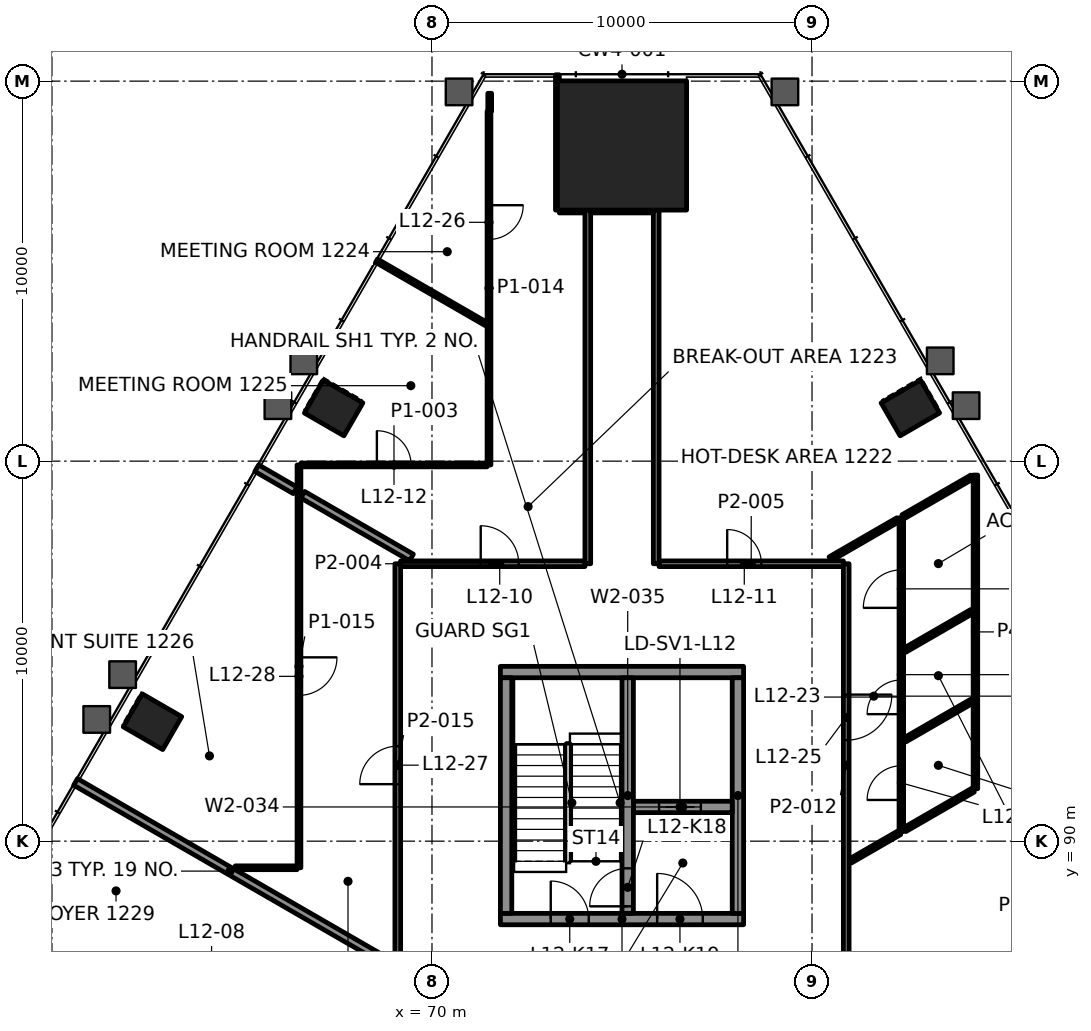
"""IFC4 building model, lengths in metres.
Left out: names, types, materials, properties, quantities, classifications, styles, units other than length and angle.
Written with IfcOpenShell. Run it as: python <this file> out.ifc"""

import sys

from ifc_helpers import new_model, si_unit, direction, frame, frame_2d, origin, origin_2d, place, context, subcontext, project, spatial, rectangle, extrude, element, fill, save


model = new_model("IFC4")
c1 = context("Model", 3, precision=1e-05, world=origin(), true_north=direction((0.0, 1.0)))
c2 = subcontext(c1, "Body", "Model", "MODEL_VIEW")
j1 = project(units=[si_unit("LENGTHUNIT", "METRE"), si_unit("PLANEANGLEUNIT", "RADIAN")], contexts=[c1])
p1 = place(None, origin())
s1 = spatial("IfcSite", under=j1, at=p1, CompositionType="ELEMENT")
p2 = place(p1, origin())
s2 = spatial("IfcBuilding", under=s1, at=p2, CompositionType="ELEMENT")
p3 = place(p2, frame((0.0, 0.0, 56.8)))
s3 = spatial("IfcBuildingStorey", under=s2, at=p3, CompositionType="ELEMENT", Elevation=56.8)
p4 = place(p3, frame((75.0, 108.307, 0.0), z_axis=(0.0, 0.0, 1.0), x_axis=(-1.0, 0.0, 0.0)))
e1 = element("IfcColumn", 1, at=p4, inside=s3, PredefinedType="COLUMN", context=c2, shape_type="SweptSolid", body=[
    extrude(rectangle(XDim=3.4, YDim=3.4, at=origin_2d()), origin(), (0.0, 0.0, 1.0), 4.2),
])
for number, where, z_axis, x_axis in (
    (2, (82.588, 101.4, -0.0), (0.0, 0.0, 1.0), (-0.5, 0.866, 0.0)),
    (3, (67.412, 101.4, -0.0), (0.0, 0.0, 1.0), (-0.5, -0.866, 0.0)),
    (4, (62.645, 93.143, -0.0), (0.0, 0.0, 1.0), (-0.5, -0.866, 0.0)),
):
    element("IfcColumn", number, at=place(p3, frame(where, z_axis=z_axis, x_axis=x_axis)), inside=s3, PredefinedType="COLUMN", context=c2, shape_type="SweptSolid", body=[
        extrude(rectangle(XDim=1.0, YDim=1.2, at=origin_2d()), origin(), (0.0, 0.0, 1.0), 4.2),
    ])
p5 = place(p3, frame((71.8, 87.95, 0.0), z_axis=(0.0, 0.0, 1.0), x_axis=(1.0, 0.0, 0.0)))
e5 = element("IfcWall", 5, at=p5, inside=s3, PredefinedType="SHEAR", context=c2, shape_type="SweptSolid", body=[
    extrude(rectangle(XDim=6.4, YDim=0.3, at=frame_2d((3.2, 0.0))), origin(), (0.0, 0.0, 1.0), 4.0),
])
p6 = place(p5, frame((1.325, 0.0, 0.0)))
e6 = element("IfcOpeningElement", 6, at=p6, cuts=e5, PredefinedType="OPENING", context=c2, shape_type="SweptSolid", body=[
    extrude(rectangle(XDim=1.0, YDim=2.1, at=frame_2d((0.5, 1.05))), frame((0.0, 0.16, 0.0), z_axis=(0.0, -1.0, 0.0), x_axis=(1.0, 0.0, 0.0)), (0.0, 0.0, 1.0), 0.32),
])
p7 = place(p5, frame((4.125, 0.0, 0.0)))
e7 = element("IfcOpeningElement", 7, at=p7, cuts=e5, PredefinedType="OPENING", context=c2, shape_type="SweptSolid", body=[
    extrude(rectangle(XDim=1.2, YDim=2.1, at=frame_2d((0.6, 1.05))), frame((0.0, 0.16, 0.0), z_axis=(0.0, -1.0, 0.0), x_axis=(1.0, 0.0, 0.0)), (0.0, 0.0, 1.0), 0.32),
])
p8 = place(p3, frame((71.8, 94.45, 0.0), z_axis=(0.0, 0.0, 1.0), x_axis=(1.0, 0.0, 0.0)))
e8 = element("IfcWall", 8, at=p8, inside=s3, PredefinedType="SHEAR", context=c2, shape_type="SweptSolid", body=[
    extrude(rectangle(XDim=6.4, YDim=0.3, at=frame_2d((3.2, 0.0))), origin(), (0.0, 0.0, 1.0), 4.0),
])
for number, where, z_axis, x_axis in (
    (9, (71.95, 88.1, 0.0), (0.0, 0.0, 1.0), (0.0, 1.0, 0.0)),
    (10, (78.05, 88.1, 0.0), (0.0, 0.0, 1.0), (0.0, 1.0, 0.0)),
):
    element("IfcWall", number, at=place(p3, frame(where, z_axis=z_axis, x_axis=x_axis)), inside=s3, PredefinedType="SHEAR", context=c2, shape_type="SweptSolid", body=[
        extrude(rectangle(XDim=6.2, YDim=0.3, at=frame_2d((3.1, 0.0))), origin(), (0.0, 0.0, 1.0), 4.0),
    ])
p9 = place(p3, frame((75.3, 90.9, 0.0), z_axis=(0.0, 0.0, 1.0), x_axis=(1.0, 0.0, 0.0)))
e11 = element("IfcWall", 11, at=p9, inside=s3, PredefinedType="SHEAR", context=c2, shape_type="SweptSolid", body=[
    extrude(rectangle(XDim=2.6, YDim=0.3, at=frame_2d((1.3, 0.0))), origin(), (0.0, 0.0, 1.0), 4.0),
])
p10 = place(p9, frame((0.675, 0.0, 0.0)))
e12 = element("IfcOpeningElement", 12, at=p10, cuts=e11, PredefinedType="OPENING", context=c2, shape_type="SweptSolid", body=[
    extrude(rectangle(XDim=1.1, YDim=2.1, at=frame_2d((0.55, 1.05))), frame((0.0, 0.16, 0.0), z_axis=(0.0, -1.0, 0.0), x_axis=(1.0, 0.0, 0.0)), (0.0, 0.0, 1.0), 0.32),
])
p11 = place(p3, frame((75.15, 88.1, 0.0), z_axis=(0.0, 0.0, 1.0), x_axis=(0.0, 1.0, 0.0)))
e13 = element("IfcWall", 13, at=p11, inside=s3, PredefinedType="SHEAR", context=c2, shape_type="SweptSolid", body=[
    extrude(rectangle(XDim=6.2, YDim=0.3, at=frame_2d((3.1, 0.0))), origin(), (0.0, 0.0, 1.0), 4.0),
])
p12 = place(p11, frame((0.185, 0.0, 0.0)))
e14 = element("IfcOpeningElement", 14, at=p12, cuts=e13, PredefinedType="OPENING", context=c2, shape_type="SweptSolid", body=[
    extrude(rectangle(XDim=1.0, YDim=2.1, at=frame_2d((0.5, 1.05))), frame((0.0, 0.16, 0.0), z_axis=(0.0, -1.0, 0.0), x_axis=(1.0, 0.0, 0.0)), (0.0, 0.0, 1.0), 0.32),
])
p13 = place(p3, frame((64.823, 89.3, 0.0), z_axis=(0.0, 0.0, 1.0), x_axis=(1.0, 0.0, 0.0)))
e15 = element("IfcWall", 15, at=p13, inside=s3, PredefinedType="PARTITIONING", context=c2, shape_type="SweptSolid", body=[
    extrude(rectangle(XDim=1.627, YDim=0.1, at=frame_2d((0.813, 0.0))), origin(), (0.0, 0.0, 1.0), 3.4),
])
p14 = place(p3, frame((69.175, 97.3, 0.0), z_axis=(0.0, 0.0, 1.0), x_axis=(1.0, 0.0, 0.0)))
e16 = element("IfcWall", 16, at=p14, inside=s3, PredefinedType="PARTITIONING", context=c2, shape_type="SweptSolid", body=[
    extrude(rectangle(XDim=4.85, YDim=0.15, at=frame_2d((2.425, 0.0))), origin(), (0.0, 0.0, 1.0), 3.4),
])
p15 = place(p14, frame((2.107, 0.0, 0.0)))
e17 = element("IfcOpeningElement", 17, at=p15, cuts=e16, PredefinedType="OPENING", context=c2, shape_type="SweptSolid", body=[
    extrude(rectangle(XDim=1.0, YDim=2.1, at=frame_2d((0.5, 1.05))), frame((0.0, 0.085, 0.0), z_axis=(0.0, -1.0, 0.0), x_axis=(1.0, 0.0, 0.0)), (0.0, 0.0, 1.0), 0.17),
])
p16 = place(p3, frame((75.975, 97.3, 0.0), z_axis=(0.0, 0.0, 1.0), x_axis=(1.0, 0.0, 0.0)))
e18 = element("IfcWall", 18, at=p16, inside=s3, PredefinedType="PARTITIONING", context=c2, shape_type="SweptSolid", body=[
    extrude(rectangle(XDim=4.85, YDim=0.15, at=frame_2d((2.425, 0.0))), origin(), (0.0, 0.0, 1.0), 3.4),
])
p17 = place(p16, frame((1.792, 0.0, 0.0)))
e19 = element("IfcOpeningElement", 19, at=p17, cuts=e18, PredefinedType="OPENING", context=c2, shape_type="SweptSolid", body=[
    extrude(rectangle(XDim=0.9, YDim=2.1, at=frame_2d((0.45, 1.05))), frame((0.0, 0.085, 0.0), z_axis=(0.0, -1.0, 0.0), x_axis=(1.0, 0.0, 0.0)), (0.0, 0.0, 1.0), 0.17),
])
p18 = place(p3, frame((66.551, 99.9, 0.0), z_axis=(0.0, 0.0, 1.0), x_axis=(1.0, 0.0, 0.0)))
e20 = element("IfcWall", 20, at=p18, inside=s3, PredefinedType="PARTITIONING", context=c2, shape_type="SweptSolid", body=[
    extrude(rectangle(XDim=4.899, YDim=0.1, at=frame_2d((2.45, 0.0))), origin(), (0.0, 0.0, 1.0), 3.165),
])
p19 = place(p18, frame((2.0, 0.0, 0.0)))
e21 = element("IfcOpeningElement", 21, at=p19, cuts=e20, PredefinedType="OPENING", context=c2, shape_type="SweptSolid", body=[
    extrude(rectangle(XDim=0.9, YDim=2.1, at=frame_2d((0.45, 1.05))), frame((0.0, 0.06, 0.0), z_axis=(0.0, -1.0, 0.0), x_axis=(1.0, 0.0, 0.0)), (0.0, 0.0, 1.0), 0.12),
])
p20 = place(p3, frame((73.351, 106.607, 0.0), z_axis=(0.0, 0.0, 1.0), x_axis=(1.0, 0.0, 0.0)))
e22 = element("IfcWall", 22, at=p20, inside=s3, PredefinedType="PARTITIONING", context=c2, shape_type="SweptSolid", body=[
    extrude(rectangle(XDim=0.674, YDim=0.15, at=frame_2d((0.337, 0.0))), origin(), (0.0, 0.0, 1.0), 3.4),
])
p21 = place(p3, frame((81.01, 89.479, 0.0), z_axis=(0.0, 0.0, 1.0), x_axis=(0.866055123991, 0.49994851956, 0.0)))
e23 = element("IfcWall", 23, at=p21, inside=s3, PredefinedType="PARTITIONING", context=c2, shape_type="SweptSolid", body=[
    extrude(rectangle(XDim=1.496, YDim=0.12, at=frame_2d((0.748, 0.0))), origin(), (0.0, 0.0, 1.0), 3.4),
])
for number, where, z_axis, x_axis in (
    (24, (82.445, 92.666, 0.0), (0.0, 0.0, 1.0), (0.866, 0.5, 0.0)),
    (25, (82.444, 95.026, 0.0), (0.0, 0.0, 1.0), (0.866, 0.5, 0.0)),
):
    element("IfcWall", number, at=place(p3, frame(where, z_axis=z_axis, x_axis=x_axis)), inside=s3, PredefinedType="PARTITIONING", context=c2, shape_type="SweptSolid", body=[
        extrude(rectangle(XDim=2.033, YDim=0.12, at=frame_2d((1.017, 0.0))), origin(), (0.0, 0.0, 1.0), 3.4),
    ])
p22 = place(p3, frame((80.479, 97.43, 0.0), z_axis=(0.0, 0.0, 1.0), x_axis=(0.866057052383, 0.499945179012, 0.0)))
e26 = element("IfcWall", 26, at=p22, inside=s3, PredefinedType="PARTITIONING", context=c2, shape_type="SweptSolid", body=[
    extrude(rectangle(XDim=2.056, YDim=0.12, at=frame_2d((1.028, 0.0))), origin(), (0.0, 0.0, 1.0), 3.4),
])
p23 = place(p3, frame((84.3, 91.379, 0.0), z_axis=(0.0, 0.0, 1.0), x_axis=(0.0, 1.0, 0.0)))
e27 = element("IfcWall", 27, at=p23, inside=s3, PredefinedType="PARTITIONING", context=c2, shape_type="SweptSolid", body=[
    extrude(rectangle(XDim=8.255, YDim=0.12, at=frame_2d((4.127, 0.0))), origin(), (0.0, 0.0, 1.0), 3.165),
])
p24 = place(p3, frame((82.35, 90.253, 0.0), z_axis=(0.0, 0.0, 1.0), x_axis=(0.0, 1.0, 0.0)))
e28 = element("IfcWall", 28, at=p24, inside=s3, PredefinedType="PARTITIONING", context=c2, shape_type="SweptSolid", body=[
    extrude(rectangle(XDim=8.257, YDim=0.12, at=frame_2d((4.128, 0.0))), origin(), (0.0, 0.0, 1.0), 3.4),
])
p25 = place(p24, frame((0.831, 0.0, 0.0)))
e29 = element("IfcOpeningElement", 29, at=p25, cuts=e28, PredefinedType="OPENING", context=c2, shape_type="SweptSolid", body=[
    extrude(rectangle(XDim=0.9, YDim=2.1, at=frame_2d((0.45, 1.05))), frame((0.0, 0.07, 0.0), z_axis=(0.0, -1.0, 0.0), x_axis=(1.0, 0.0, 0.0)), (0.0, 0.0, 1.0), 0.14),
])
p26 = place(p24, frame((3.089, 0.0, 0.0)))
e30 = element("IfcOpeningElement", 30, at=p26, cuts=e28, PredefinedType="OPENING", context=c2, shape_type="SweptSolid", body=[
    extrude(rectangle(XDim=0.9, YDim=2.1, at=frame_2d((0.45, 1.05))), frame((0.0, 0.07, 0.0), z_axis=(0.0, -1.0, 0.0), x_axis=(1.0, 0.0, 0.0)), (0.0, 0.0, 1.0), 0.14),
])
p27 = place(p24, frame((5.886, 0.0, 0.0)))
e31 = element("IfcOpeningElement", 31, at=p27, cuts=e28, PredefinedType="OPENING", context=c2, shape_type="SweptSolid", body=[
    extrude(rectangle(XDim=1.0, YDim=2.1, at=frame_2d((0.5, 1.05))), frame((0.0, 0.07, 0.0), z_axis=(0.0, -1.0, 0.0), x_axis=(1.0, 0.0, 0.0)), (0.0, 0.0, 1.0), 0.14),
])
p28 = place(p3, frame((80.9, 97.3, 0.0), z_axis=(0.0, 0.0, 1.0), x_axis=(0.0, -1.0, 0.0)))
e32 = element("IfcWall", 32, at=p28, inside=s3, PredefinedType="PARTITIONING", context=c2, shape_type="SweptSolid", body=[
    extrude(rectangle(XDim=10.6, YDim=0.15, at=frame_2d((5.3, 0.0))), origin(), (0.0, 0.0, 1.0), 3.4),
])
p29 = place(p28, frame((3.444, 0.0, 0.0)))
e33 = element("IfcOpeningElement", 33, at=p29, cuts=e32, PredefinedType="OPENING", context=c2, shape_type="SweptSolid", body=[
    extrude(rectangle(XDim=1.2, YDim=2.1, at=frame_2d((0.6, 1.05))), frame((0.0, 0.085, 0.0), z_axis=(0.0, -1.0, 0.0), x_axis=(1.0, 0.0, 0.0)), (0.0, 0.0, 1.0), 0.17),
])
p30 = place(p3, frame((75.9, 97.3, 0.0), z_axis=(0.0, 0.0, 1.0), x_axis=(0.0, 1.0, 0.0)))
e34 = element("IfcWall", 34, at=p30, inside=s3, PredefinedType="PARTITIONING", context=c2, shape_type="SweptSolid", body=[
    extrude(rectangle(XDim=9.306, YDim=0.15, at=frame_2d((4.653, 0.0))), origin(), (0.0, 0.0, 1.0), 3.4),
])
p31 = place(p3, frame((74.1, 97.3, 0.0), z_axis=(0.0, 0.0, 1.0), x_axis=(0.0, 1.0, 0.0)))
e35 = element("IfcWall", 35, at=p31, inside=s3, PredefinedType="PARTITIONING", context=c2, shape_type="SweptSolid", body=[
    extrude(rectangle(XDim=9.307, YDim=0.15, at=frame_2d((4.653, 0.0))), origin(), (0.0, 0.0, 1.0), 3.4),
])
p32 = place(p3, frame((73.3, 106.607, 0.0), z_axis=(0.0, 0.0, 1.0), x_axis=(0.0, 1.0, 0.0)))
e36 = element("IfcWall", 36, at=p32, inside=s3, PredefinedType="PARTITIONING", context=c2, shape_type="SweptSolid", body=[
    extrude(rectangle(XDim=3.56, YDim=0.1, at=frame_2d((1.78, 0.0))), origin(), (0.0, 0.0, 1.0), 3.4),
])
p33 = place(p3, frame((71.519, 109.207, 0.0), z_axis=(0.0, 0.0, 1.0), x_axis=(0.0, 1.0, 0.0)))
e37 = element("IfcWall", 37, at=p33, inside=s3, PredefinedType="PARTITIONING", context=c2, shape_type="SweptSolid", body=[
    extrude(rectangle(XDim=0.473, YDim=0.1, at=frame_2d((0.237, 0.0))), origin(), (0.0, 0.0, 1.0), 3.4),
])
p34 = place(p3, frame((71.5, 109.206, 0.0), z_axis=(0.0, 0.0, 1.0), x_axis=(0.0, -1.0, 0.0)))
e38 = element("IfcWall", 38, at=p34, inside=s3, PredefinedType="PARTITIONING", context=c2, shape_type="SweptSolid", body=[
    extrude(rectangle(XDim=9.306, YDim=0.1, at=frame_2d((4.653, 0.0))), origin(), (0.0, 0.0, 1.0), 3.4),
])
p35 = place(p34, frame((2.471, 0.0, 0.0)))
e39 = element("IfcOpeningElement", 39, at=p35, cuts=e38, PredefinedType="OPENING", context=c2, shape_type="SweptSolid", body=[
    extrude(rectangle(XDim=0.9, YDim=2.1, at=frame_2d((0.45, 1.05))), frame((0.0, 0.06, 0.0), z_axis=(0.0, -1.0, 0.0), x_axis=(1.0, 0.0, 0.0)), (0.0, 0.0, 1.0), 0.12),
])
p36 = place(p3, frame((69.1, 86.7, 0.0), z_axis=(0.0, 0.0, 1.0), x_axis=(0.0, 1.0, 0.0)))
e40 = element("IfcWall", 40, at=p36, inside=s3, PredefinedType="PARTITIONING", context=c2, shape_type="SweptSolid", body=[
    extrude(rectangle(XDim=10.6, YDim=0.15, at=frame_2d((5.3, 0.0))), origin(), (0.0, 0.0, 1.0), 3.4),
])
p37 = place(p36, frame((4.8, 0.0, 0.0)))
e41 = element("IfcOpeningElement", 41, at=p37, cuts=e40, PredefinedType="OPENING", context=c2, shape_type="SweptSolid", body=[
    extrude(rectangle(XDim=1.0, YDim=2.1, at=frame_2d((0.5, 1.05))), frame((0.0, 0.085, 0.0), z_axis=(0.0, -1.0, 0.0), x_axis=(1.0, 0.0, 0.0)), (0.0, 0.0, 1.0), 0.17),
])
p38 = place(p3, frame((66.5, 99.899, 0.0), z_axis=(0.0, 0.0, 1.0), x_axis=(0.0, -1.0, 0.0)))
e42 = element("IfcWall", 42, at=p38, inside=s3, PredefinedType="PARTITIONING", context=c2, shape_type="SweptSolid", body=[
    extrude(rectangle(XDim=10.599, YDim=0.1, at=frame_2d((5.3, 0.0))), origin(), (0.0, 0.0, 1.0), 3.165),
])
p39 = place(p38, frame((5.062, 0.0, 0.0)))
e43 = element("IfcOpeningElement", 43, at=p39, cuts=e42, PredefinedType="OPENING", context=c2, shape_type="SweptSolid", body=[
    extrude(rectangle(XDim=1.0, YDim=2.1, at=frame_2d((0.5, 1.05))), frame((0.0, 0.06, 0.0), z_axis=(0.0, -1.0, 0.0), x_axis=(1.0, 0.0, 0.0)), (0.0, 0.0, 1.0), 0.12),
])
p40 = place(p3, frame((71.424, 103.61, 0.0), z_axis=(0.0, 0.0, 1.0), x_axis=(-0.866004823592, 0.500035644245, 0.0)))
e44 = element("IfcWall", 44, at=p40, inside=s3, PredefinedType="PARTITIONING", context=c2, shape_type="SweptSolid", body=[
    extrude(rectangle(XDim=3.329, YDim=0.1, at=frame_2d((1.665, 0.0))), origin(), (0.0, 0.0, 1.0), 3.4),
])
p41 = place(p3, frame((69.46, 97.465, 0.0), z_axis=(0.0, 0.0, 1.0), x_axis=(-0.866027998537, 0.499995505729, 0.0)))
e45 = element("IfcWall", 45, at=p41, inside=s3, PredefinedType="PARTITIONING", context=c2, shape_type="SweptSolid", body=[
    extrude(rectangle(XDim=3.302, YDim=0.2, at=frame_2d((1.651, 0.0))), origin(), (0.0, 0.0, 1.0), 3.4),
])
p42 = place(p3, frame((68.751, 86.865, 0.0), z_axis=(0.0, 0.0, 1.0), x_axis=(-0.8660257632, 0.499999377474, 0.0)))
e46 = element("IfcWall", 46, at=p42, inside=s3, PredefinedType="PARTITIONING", context=c2, shape_type="SweptSolid", body=[
    extrude(rectangle(XDim=9.387, YDim=0.2, at=frame_2d((4.693, 0.0))), origin(), (0.0, 0.0, 1.0), 3.165),
])
p43 = place(p3, frame((74.175, 106.607, 0.0), z_axis=(0.0, 0.0, 1.0), x_axis=(1.0, 0.0, 0.0)))
e47 = element("IfcWall", 47, at=p43, inside=s3, PredefinedType="PARTITIONING", context=c2, shape_type="SweptSolid", body=[
    extrude(rectangle(XDim=1.649, YDim=0.15, at=frame_2d((0.825, 0.0))), origin(), (0.0, 0.0, 1.0), 3.397),
])
p44 = place(p3, frame((82.44, 90.304, 0.0), z_axis=(0.0, 0.0, 1.0), x_axis=(0.866044773228, 0.499966449638, 0.0)))
e48 = element("IfcWall", 48, at=p44, inside=s3, PredefinedType="PARTITIONING", context=c2, shape_type="SweptSolid", body=[
    extrude(rectangle(XDim=2.079, YDim=0.12, at=frame_2d((1.04, 0.0))), origin(), (0.0, 0.0, 1.0), 3.4),
])
p45 = place(p3, frame((82.395, 98.536, 0.0), z_axis=(0.0, 0.0, 1.0), x_axis=(0.866041603473, 0.499971940267, 0.0)))
e49 = element("IfcWall", 49, at=p45, inside=s3, PredefinedType="PARTITIONING", context=c2, shape_type="SweptSolid", body=[
    extrude(rectangle(XDim=2.089, YDim=0.12, at=frame_2d((1.045, 0.0))), origin(), (0.0, 0.0, 1.0), 3.165),
])
p46 = place(p3, frame((66.4, 99.231, 0.0), z_axis=(0.0, 0.0, 1.0), x_axis=(-0.86600796803, 0.500030198396, 0.0)))
e50 = element("IfcWall", 50, at=p46, inside=s3, PredefinedType="PARTITIONING", context=c2, shape_type="SweptSolid", body=[
    extrude(rectangle(XDim=1.167, YDim=0.2, at=frame_2d((0.584, 0.0))), origin(), (0.0, 0.0, 1.0), 3.165),
])
p47 = place(p15, origin())
e51 = element("IfcDoor", 51, at=p47, inside=s3, OperationType="SINGLE_SWING_RIGHT", PredefinedType="DOOR", context=c2, shape_type="SweptSolid", body=[
    extrude(rectangle(XDim=1.0, YDim=2.1, at=frame_2d((0.5, 1.05))), frame((0.0, 0.025, 0.0), z_axis=(0.0, -1.0, 0.0), x_axis=(1.0, 0.0, 0.0)), (0.0, 0.0, 1.0), 0.05),
])
fill(e17, e51)
p48 = place(p17, origin())
e52 = element("IfcDoor", 52, at=p48, inside=s3, OperationType="SINGLE_SWING_LEFT", PredefinedType="DOOR", context=c2, shape_type="SweptSolid", body=[
    extrude(rectangle(XDim=0.9, YDim=2.1, at=frame_2d((0.45, 1.05))), frame((0.0, 0.025, 0.0), z_axis=(0.0, -1.0, 0.0), x_axis=(1.0, 0.0, 0.0)), (0.0, 0.0, 1.0), 0.05),
])
fill(e19, e52)
p49 = place(p19, origin())
e53 = element("IfcDoor", 53, at=p49, inside=s3, OperationType="SINGLE_SWING_RIGHT", PredefinedType="DOOR", context=c2, shape_type="SweptSolid", body=[
    extrude(rectangle(XDim=0.9, YDim=2.1, at=frame_2d((0.45, 1.05))), frame((0.0, 0.025, 0.0), z_axis=(0.0, -1.0, 0.0), x_axis=(1.0, 0.0, 0.0)), (0.0, 0.0, 1.0), 0.05),
])
fill(e21, e53)
p50 = place(p25, origin())
e54 = element("IfcDoor", 54, at=p50, inside=s3, OperationType="SINGLE_SWING_RIGHT", PredefinedType="DOOR", context=c2, shape_type="SweptSolid", body=[
    extrude(rectangle(XDim=0.9, YDim=2.1, at=frame_2d((0.45, 1.05))), frame((0.0, 0.025, 0.0), z_axis=(0.0, -1.0, 0.0), x_axis=(1.0, 0.0, 0.0)), (0.0, 0.0, 1.0), 0.05),
])
fill(e29, e54)
p51 = place(p26, origin())
e55 = element("IfcDoor", 55, at=p51, inside=s3, OperationType="SINGLE_SWING_LEFT", PredefinedType="DOOR", context=c2, shape_type="SweptSolid", body=[
    extrude(rectangle(XDim=0.9, YDim=2.1, at=frame_2d((0.45, 1.05))), frame((0.0, 0.025, 0.0), z_axis=(0.0, -1.0, 0.0), x_axis=(1.0, 0.0, 0.0)), (0.0, 0.0, 1.0), 0.05),
])
fill(e30, e55)
p52 = place(p27, origin())
e56 = element("IfcDoor", 56, at=p52, inside=s3, OperationType="SINGLE_SWING_RIGHT", PredefinedType="DOOR", context=c2, shape_type="SweptSolid", body=[
    extrude(rectangle(XDim=1.0, YDim=2.1, at=frame_2d((0.5, 1.05))), frame((0.0, 0.025, 0.0), z_axis=(0.0, -1.0, 0.0), x_axis=(1.0, 0.0, 0.0)), (0.0, 0.0, 1.0), 0.05),
])
fill(e31, e56)
p53 = place(p29, origin())
e57 = element("IfcDoor", 57, at=p53, inside=s3, OperationType="DOUBLE_DOOR_SINGLE_SWING", PredefinedType="DOOR", context=c2, shape_type="SweptSolid", body=[
    extrude(rectangle(XDim=1.2, YDim=2.1, at=frame_2d((0.6, 1.05))), frame((0.0, 0.025, 0.0), z_axis=(0.0, -1.0, 0.0), x_axis=(1.0, 0.0, 0.0)), (0.0, 0.0, 1.0), 0.05),
])
fill(e33, e57)
p54 = place(p35, origin())
e58 = element("IfcDoor", 58, at=p54, inside=s3, OperationType="SINGLE_SWING_RIGHT", PredefinedType="DOOR", context=c2, shape_type="SweptSolid", body=[
    extrude(rectangle(XDim=0.9, YDim=2.1, at=frame_2d((0.45, 1.05))), frame((0.0, 0.025, 0.0), z_axis=(0.0, -1.0, 0.0), x_axis=(1.0, 0.0, 0.0)), (0.0, 0.0, 1.0), 0.05),
])
fill(e39, e58)
p55 = place(p37, origin())
e59 = element("IfcDoor", 59, at=p55, inside=s3, OperationType="SINGLE_SWING_RIGHT", PredefinedType="DOOR", context=c2, shape_type="SweptSolid", body=[
    extrude(rectangle(XDim=1.0, YDim=2.1, at=frame_2d((0.5, 1.05))), frame((0.0, 0.025, 0.0), z_axis=(0.0, -1.0, 0.0), x_axis=(1.0, 0.0, 0.0)), (0.0, 0.0, 1.0), 0.05),
])
fill(e41, e59)
p56 = place(p39, origin())
e60 = element("IfcDoor", 60, at=p56, inside=s3, OperationType="SINGLE_SWING_RIGHT", PredefinedType="DOOR", context=c2, shape_type="SweptSolid", body=[
    extrude(rectangle(XDim=1.0, YDim=2.1, at=frame_2d((0.5, 1.05))), frame((0.0, 0.025, 0.0), z_axis=(0.0, -1.0, 0.0), x_axis=(1.0, 0.0, 0.0)), (0.0, 0.0, 1.0), 0.05),
])
fill(e43, e60)
p57 = place(p10, origin())
e61 = element("IfcDoor", 61, at=p57, inside=s3, OperationType="DOUBLE_DOOR_SLIDING", PredefinedType="DOOR", context=c2, shape_type="SweptSolid", body=[
    extrude(rectangle(XDim=1.1, YDim=2.1, at=frame_2d((0.55, 1.05))), frame((0.0, 0.025, 0.0), z_axis=(0.0, -1.0, 0.0), x_axis=(1.0, 0.0, 0.0)), (0.0, 0.0, 1.0), 0.05),
])
fill(e12, e61)
p58 = place(p6, origin())
e62 = element("IfcDoor", 62, at=p58, inside=s3, OperationType="SINGLE_SWING_RIGHT", PredefinedType="DOOR", context=c2, shape_type="SweptSolid", body=[
    extrude(rectangle(XDim=1.0, YDim=2.1, at=frame_2d((0.5, 1.05))), frame((0.0, 0.025, 0.0), z_axis=(0.0, -1.0, 0.0), x_axis=(1.0, 0.0, 0.0)), (0.0, 0.0, 1.0), 0.05),
])
fill(e6, e62)
p59 = place(p12, origin())
e63 = element("IfcDoor", 63, at=p59, inside=s3, OperationType="SINGLE_SWING_LEFT", PredefinedType="DOOR", context=c2, shape_type="SweptSolid", body=[
    extrude(rectangle(XDim=1.0, YDim=2.1, at=frame_2d((0.5, 1.05))), frame((0.0, 0.025, 0.0), z_axis=(0.0, -1.0, 0.0), x_axis=(1.0, 0.0, 0.0)), (0.0, 0.0, 1.0), 0.05),
])
fill(e14, e63)
p60 = place(p7, origin())
e64 = element("IfcDoor", 64, at=p60, inside=s3, OperationType="SINGLE_SWING_RIGHT", PredefinedType="DOOR", context=c2, shape_type="SweptSolid", body=[
    extrude(rectangle(XDim=1.2, YDim=2.1, at=frame_2d((0.6, 1.05))), frame((0.0, 0.025, 0.0), z_axis=(0.0, -1.0, 0.0), x_axis=(1.0, 0.0, 0.0)), (0.0, 0.0, 1.0), 0.05),
])
fill(e7, e64)
save(model, sys.argv[1])
